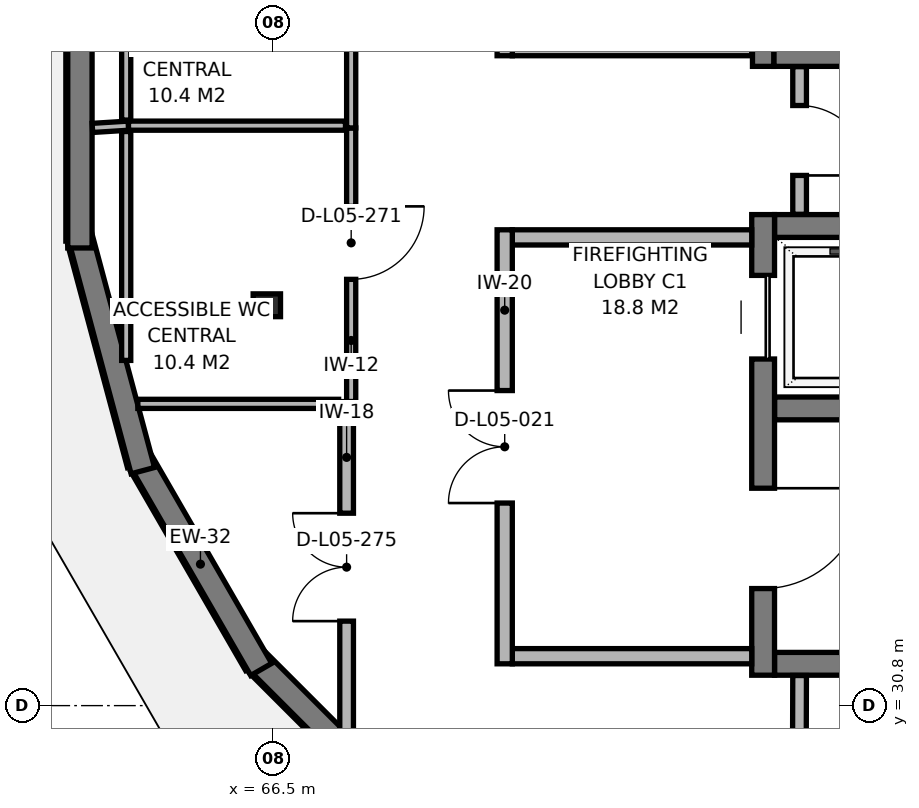
"""IFC4 building model, lengths in metres.
Left out: names, types, materials, properties, quantities, classifications, styles, units other than length and angle.
Written with IfcOpenShell. Run it as: python <this file> out.ifc"""

import sys

from ifc_helpers import new_model, si_unit, direction, frame, frame_2d, origin, origin_2d, place, context, subcontext, project, spatial, rectangle, i_section, extrude, element, fill, save


model = new_model("IFC4")
c1 = context("Model", 3, precision=1e-05, world=origin(), true_north=direction((0.0, 1.0)))
c2 = subcontext(c1, "Body", "Model", "MODEL_VIEW")
j1 = project(units=[si_unit("LENGTHUNIT", "METRE"), si_unit("PLANEANGLEUNIT", "RADIAN")], contexts=[c1])
p1 = place(None, origin())
s1 = spatial("IfcSite", under=j1, at=p1, CompositionType="ELEMENT")
p2 = place(p1, origin())
s2 = spatial("IfcBuilding", under=s1, at=p2, CompositionType="ELEMENT")
p3 = place(p2, frame((0.0, 0.0, 21.6)))
s3 = spatial("IfcBuildingStorey", under=s2, at=p3, CompositionType="ELEMENT", Elevation=21.6)
p4 = place(p3, frame((66.42, 36.067, 0.0), z_axis=(0.0, 0.0, 1.0), x_axis=(1.0, 0.0, 0.0)))
e1 = element("IfcColumn", 1, at=p4, inside=s3, PredefinedType="COLUMN", context=c2, shape_type="SweptSolid", body=[
    extrude(i_section(OverallWidth=0.3, OverallDepth=0.36, WebThickness=0.012, FlangeThickness=0.022, FilletRadius=0.027, at=origin_2d()), origin(), (0.0, 0.0, 1.0), 4.2),
])
p5 = place(p3, frame((68.528, 29.153, 0.0), z_axis=(0.0, 0.0, 1.0), x_axis=(-0.707106781187, 0.707106781187, 0.0)))
e2 = element("IfcWall", 2, at=p5, inside=s3, PredefinedType="SOLIDWALL", context=c2, shape_type="SweptSolid", body=[
    extrude(rectangle(XDim=3.198, YDim=0.32, at=frame_2d((1.599, 0.0))), origin(), (0.0, 0.0, 1.0), 4.0),
])
p6 = place(p3, frame((66.346, 31.276, 0.0), z_axis=(0.0, 0.0, 1.0), x_axis=(-0.499964726069, 0.86604576824, 0.0)))
e3 = element("IfcWall", 3, at=p6, inside=s3, PredefinedType="SOLIDWALL", context=c2, shape_type="SweptSolid", body=[
    extrude(rectangle(XDim=3.198, YDim=0.32, at=frame_2d((1.599, 0.0))), origin(), (0.0, 0.0, 1.0), 4.0),
])
for number, where, z_axis, x_axis in (
    (4, (64.789, 33.892, 0.0), (0.0, 0.0, 1.0), (-0.259, 0.966, 0.0)),
    (5, (63.961, 36.821, 0.0), (0.0, 0.0, 1.0), (0.0, 1.0, 0.0)),
):
    element("IfcWall", number, at=place(p3, frame(where, z_axis=z_axis, x_axis=x_axis)), inside=s3, PredefinedType="SOLIDWALL", context=c2, shape_type="SweptSolid", body=[
        extrude(rectangle(XDim=3.198, YDim=0.32, at=frame_2d((1.599, 0.0))), origin(), (0.0, 0.0, 1.0), 4.0),
    ])
for number, where, z_axis, x_axis in (
    (6, (73.1, 31.35, 0.0), (0.0, 0.0, 1.0), (1.0, 0.0, 0.0)),
    (7, (80.8, 34.71, 0.0), (0.0, 0.0, 1.0), (-1.0, 0.0, 0.0)),
):
    element("IfcWall", number, at=place(p3, frame(where, z_axis=z_axis, x_axis=x_axis)), inside=s3, PredefinedType="SHEAR", context=c2, shape_type="SweptSolid", body=[
        extrude(rectangle(XDim=7.7, YDim=0.3, at=frame_2d((3.85, 0.0))), origin(), (0.0, 0.0, 1.0), 4.0),
    ])
p7 = place(p3, frame((76.3, 37.11, 0.0), z_axis=(0.0, 0.0, 1.0), x_axis=(-1.0, 0.0, 0.0)))
e8 = element("IfcWall", 8, at=p7, inside=s3, PredefinedType="SHEAR", context=c2, shape_type="SweptSolid", body=[
    extrude(rectangle(XDim=3.2, YDim=0.3, at=frame_2d((1.6, 0.0))), origin(), (0.0, 0.0, 1.0), 4.0),
])
p8 = place(p3, frame((72.95, 37.26, 0.0), z_axis=(0.0, 0.0, 1.0), x_axis=(0.0, -1.0, 0.0)))
e9 = element("IfcWall", 9, at=p8, inside=s3, PredefinedType="SHEAR", context=c2, shape_type="SweptSolid", body=[
    extrude(rectangle(XDim=6.06, YDim=0.3, at=frame_2d((3.03, 0.0))), origin(), (0.0, 0.0, 1.0), 4.0),
])
p9 = place(p8, frame((0.8, 0.0, 0.0)))
e10 = element("IfcOpeningElement", 10, at=p9, cuts=e9, PredefinedType="OPENING", context=c2, shape_type="SweptSolid", body=[
    extrude(rectangle(XDim=1.1, YDim=2.12, at=frame_2d((0.55, 1.06))), frame((0.0, 0.16, 0.0), z_axis=(0.0, -1.0, 0.0), x_axis=(1.0, 0.0, 0.0)), (0.0, 0.0, 1.0), 0.32),
])
p10 = place(p8, frame((3.6, 0.0, 0.0)))
e11 = element("IfcOpeningElement", 11, at=p10, cuts=e9, PredefinedType="OPENING", context=c2, shape_type="SweptSolid", body=[
    extrude(rectangle(XDim=1.32, YDim=2.12, at=frame_2d((0.66, 1.06))), frame((0.0, 0.16, 0.0), z_axis=(0.0, -1.0, 0.0), x_axis=(1.0, 0.0, 0.0)), (0.0, 0.0, 1.0), 0.32),
])
p11 = place(p3, frame((69.65, 31.45, 0.0), z_axis=(0.0, 0.0, 1.0), x_axis=(1.0, 0.0, 0.0)))
e12 = element("IfcWall", 12, at=p11, inside=s3, PredefinedType="PARTITIONING", context=c2, shape_type="SweptSolid", body=[
    extrude(rectangle(XDim=3.15, YDim=0.2, at=frame_2d((1.575, 0.0))), origin(), (0.0, 0.0, 1.0), 3.49),
])
p12 = place(p3, frame((72.8, 36.96, 0.0), z_axis=(0.0, 0.0, 1.0), x_axis=(-1.0, 0.0, 0.0)))
e13 = element("IfcWall", 13, at=p12, inside=s3, PredefinedType="PARTITIONING", context=c2, shape_type="SweptSolid", body=[
    extrude(rectangle(XDim=3.15, YDim=0.2, at=frame_2d((1.575, 0.0))), origin(), (0.0, 0.0, 1.0), 4.0),
])
p13 = place(p3, frame((69.55, 31.35, 0.0), z_axis=(0.0, 0.0, 1.0), x_axis=(0.0, 1.0, 0.0)))
e14 = element("IfcWall", 14, at=p13, inside=s3, PredefinedType="PARTITIONING", context=c2, shape_type="SweptSolid", body=[
    extrude(rectangle(XDim=5.71, YDim=0.2, at=frame_2d((2.855, 0.0))), origin(), (0.0, 0.0, 1.0), 3.49),
])
p14 = place(p13, frame((2.115, 0.0, 0.0)))
e15 = element("IfcOpeningElement", 15, at=p14, cuts=e14, PredefinedType="OPENING", context=c2, shape_type="SweptSolid", body=[
    extrude(rectangle(XDim=1.48, YDim=2.15, at=frame_2d((0.74, 1.075))), frame((0.0, 0.11, 0.0), z_axis=(0.0, -1.0, 0.0), x_axis=(1.0, 0.0, 0.0)), (0.0, 0.0, 1.0), 0.22),
])
p15 = place(p3, frame((73.09, 39.35, 0.0), z_axis=(0.0, 0.0, 1.0), x_axis=(1.0, 0.0, 0.0)))
e16 = element("IfcWall", 16, at=p15, inside=s3, PredefinedType="SHEAR", context=c2, shape_type="SweptSolid", body=[
    extrude(rectangle(XDim=7.7, YDim=0.28, at=frame_2d((3.85, 0.0))), origin(), (0.0, 0.0, 1.0), 4.0),
])
p16 = place(p3, frame((72.95, 45.25, 0.0), z_axis=(0.0, 0.0, 1.0), x_axis=(0.0, -1.0, 0.0)))
e17 = element("IfcWall", 17, at=p16, inside=s3, PredefinedType="SHEAR", context=c2, shape_type="SweptSolid", body=[
    extrude(rectangle(XDim=6.04, YDim=0.28, at=frame_2d((3.02, 0.0))), origin(), (0.0, 0.0, 1.0), 4.0),
])
p17 = place(p16, frame((0.8, 0.0, 0.0)))
e18 = element("IfcOpeningElement", 18, at=p17, cuts=e17, PredefinedType="OPENING", context=c2, shape_type="SweptSolid", body=[
    extrude(rectangle(XDim=1.1, YDim=2.12, at=frame_2d((0.55, 1.06))), frame((0.0, 0.15, 0.0), z_axis=(0.0, -1.0, 0.0), x_axis=(1.0, 0.0, 0.0)), (0.0, 0.0, 1.0), 0.3),
])
p18 = place(p16, frame((3.6, 0.0, 0.0)))
e19 = element("IfcOpeningElement", 19, at=p18, cuts=e17, PredefinedType="OPENING", context=c2, shape_type="SweptSolid", body=[
    extrude(rectangle(XDim=1.32, YDim=2.12, at=frame_2d((0.66, 1.06))), frame((0.0, 0.15, 0.0), z_axis=(0.0, -1.0, 0.0), x_axis=(1.0, 0.0, 0.0)), (0.0, 0.0, 1.0), 0.3),
])
p19 = place(p3, frame((69.65, 39.45, 0.0), z_axis=(0.0, 0.0, 1.0), x_axis=(1.0, 0.0, 0.0)))
e20 = element("IfcWall", 20, at=p19, inside=s3, PredefinedType="PARTITIONING", context=c2, shape_type="SweptSolid", body=[
    extrude(rectangle(XDim=3.15, YDim=0.2, at=frame_2d((1.575, 0.0))), origin(), (0.0, 0.0, 1.0), 4.0),
])
p20 = place(p3, frame((69.55, 39.35, 0.0), z_axis=(0.0, 0.0, 1.0), x_axis=(0.0, 1.0, 0.0)))
e21 = element("IfcWall", 21, at=p20, inside=s3, PredefinedType="PARTITIONING", context=c2, shape_type="SweptSolid", body=[
    extrude(rectangle(XDim=5.71, YDim=0.2, at=frame_2d((2.855, 0.0))), origin(), (0.0, 0.0, 1.0), 3.49),
])
p21 = place(p20, frame((2.115, 0.0, 0.0)))
e22 = element("IfcOpeningElement", 22, at=p21, cuts=e21, PredefinedType="OPENING", context=c2, shape_type="SweptSolid", body=[
    extrude(rectangle(XDim=1.48, YDim=2.15, at=frame_2d((0.74, 1.075))), frame((0.0, 0.11, 0.0), z_axis=(0.0, -1.0, 0.0), x_axis=(1.0, 0.0, 0.0)), (0.0, 0.0, 1.0), 0.22),
])
p22 = place(p3, frame((67.53, 38.4, 0.0), z_axis=(0.0, 0.0, 1.0), x_axis=(0.0, -1.0, 0.0)))
e23 = element("IfcWall", 23, at=p22, inside=s3, PredefinedType="PARTITIONING", context=c2, shape_type="SweptSolid", body=[
    extrude(rectangle(XDim=3.6, YDim=0.12, at=frame_2d((1.8, 0.0))), origin(), (0.0, 0.0, 1.0), 3.49),
])
p23 = place(p22, frame((1.032, 0.0, 0.0)))
e24 = element("IfcOpeningElement", 24, at=p23, cuts=e23, PredefinedType="OPENING", context=c2, shape_type="SweptSolid", body=[
    extrude(rectangle(XDim=0.96, YDim=2.1, at=frame_2d((0.48, 1.05))), frame((0.0, 0.07, 0.0), z_axis=(0.0, -1.0, 0.0), x_axis=(1.0, 0.0, 0.0)), (0.0, 0.0, 1.0), 0.14),
])
p24 = place(p3, frame((67.53, 42.0, 0.0), z_axis=(0.0, 0.0, 1.0), x_axis=(0.0, -1.0, 0.0)))
e25 = element("IfcWall", 25, at=p24, inside=s3, PredefinedType="PARTITIONING", context=c2, shape_type="SweptSolid", body=[
    extrude(rectangle(XDim=3.6, YDim=0.12, at=frame_2d((1.8, 0.0))), origin(), (0.0, 0.0, 1.0), 3.49),
])
p25 = place(p24, frame((1.29, 0.0, 0.0)))
e26 = element("IfcOpeningElement", 26, at=p25, cuts=e25, PredefinedType="OPENING", context=c2, shape_type="SweptSolid", body=[
    extrude(rectangle(XDim=1.02, YDim=2.12, at=frame_2d((0.51, 1.06))), frame((0.0, 0.07, 0.0), z_axis=(0.0, -1.0, 0.0), x_axis=(1.0, 0.0, 0.0)), (0.0, 0.0, 1.0), 0.14),
])
p26 = place(p3, frame((73.43, 39.206, 0.0), z_axis=(0.0, 0.0, 1.0), x_axis=(0.0, -1.0, 0.0)))
e27 = element("IfcWall", 27, at=p26, inside=s3, PredefinedType="PARTITIONING", context=c2, shape_type="SweptSolid", body=[
    extrude(rectangle(XDim=1.942, YDim=0.18, at=frame_2d((0.971, 0.0))), origin(), (0.0, 0.0, 1.0), 3.99),
])
p27 = place(p26, frame((0.511, 0.0, 0.0)))
e28 = element("IfcOpeningElement", 28, at=p27, cuts=e27, PredefinedType="OPENING", context=c2, shape_type="SweptSolid", body=[
    extrude(rectangle(XDim=0.92, YDim=2.08, at=frame_2d((0.46, 1.04))), frame((0.0, 0.1, 0.0), z_axis=(0.0, -1.0, 0.0), x_axis=(1.0, 0.0, 0.0)), (0.0, 0.0, 1.0), 0.2),
])
p28 = place(p3, frame((73.43, 31.196, 0.0), z_axis=(0.0, 0.0, 1.0), x_axis=(-0.00291284467, -0.999995757659, 0.0)))
e29 = element("IfcWall", 29, at=p28, inside=s3, PredefinedType="PARTITIONING", context=c2, shape_type="SweptSolid", body=[
    extrude(rectangle(XDim=3.017, YDim=0.18, at=frame_2d((1.509, 0.0))), origin(), (0.0, 0.0, 1.0), 3.49),
])
p29 = place(p3, frame((67.47, 30.443, 0.0), z_axis=(0.0, 0.0, 1.0), x_axis=(0.0, 1.0, 0.0)))
e30 = element("IfcWall", 30, at=p29, inside=s3, PredefinedType="PARTITIONING", context=c2, shape_type="SweptSolid", body=[
    extrude(rectangle(XDim=4.357, YDim=0.18, at=frame_2d((2.178, 0.0))), origin(), (0.0, 0.0, 1.0), 3.49),
])
p30 = place(p29, frame((1.469, 0.0, 0.0)))
e31 = element("IfcOpeningElement", 31, at=p30, cuts=e30, PredefinedType="OPENING", context=c2, shape_type="SweptSolid", body=[
    extrude(rectangle(XDim=1.42, YDim=2.18, at=frame_2d((0.71, 1.09))), frame((0.0, 0.1, 0.0), z_axis=(0.0, -1.0, 0.0), x_axis=(1.0, 0.0, 0.0)), (0.0, 0.0, 1.0), 0.2),
])
p31 = place(p3, frame((64.125, 38.4, 0.0), z_axis=(0.0, 0.0, 1.0), x_axis=(0.998072483986, 0.062058977678, 0.0)))
e32 = element("IfcWall", 32, at=p31, inside=s3, PredefinedType="PARTITIONING", context=c2, shape_type="SweptSolid", body=[
    extrude(rectangle(XDim=0.476, YDim=0.12, at=frame_2d((0.238, 0.0))), origin(), (0.0, 0.0, 1.0), 3.99),
])
p32 = place(p3, frame((64.6, 38.43, 0.0), z_axis=(0.0, 0.0, 1.0), x_axis=(1.0, 0.0, 0.0)))
e33 = element("IfcWall", 33, at=p32, inside=s3, PredefinedType="PARTITIONING", context=c2, shape_type="SweptSolid", body=[
    extrude(rectangle(XDim=2.855, YDim=0.12, at=frame_2d((1.427, 0.0))), origin(), (0.0, 0.0, 1.0), 3.49),
])
p33 = place(p3, frame((64.57, 35.342, 0.0), z_axis=(0.0, 0.0, 1.0), x_axis=(0.0, 1.0, 0.0)))
e34 = element("IfcWall", 34, at=p33, inside=s3, PredefinedType="PARTITIONING", context=c2, shape_type="SweptSolid", body=[
    extrude(rectangle(XDim=3.011, YDim=0.12, at=frame_2d((1.506, 0.0))), origin(), (0.0, 0.0, 1.0), 3.99),
])
p34 = place(p3, frame((67.365, 34.77, 0.0), z_axis=(0.0, 0.0, 1.0), x_axis=(-1.0, 0.0, 0.0)))
e35 = element("IfcWall", 35, at=p34, inside=s3, PredefinedType="PARTITIONING", context=c2, shape_type="SweptSolid", body=[
    extrude(rectangle(XDim=2.642, YDim=0.12, at=frame_2d((1.321, 0.0))), origin(), (0.0, 0.0, 1.0), 3.49),
])
p35 = place(p3, frame((64.57, 38.503, 0.0), z_axis=(0.0, 0.0, 1.0), x_axis=(0.0, 1.0, 0.0)))
e36 = element("IfcWall", 36, at=p35, inside=s3, PredefinedType="PARTITIONING", context=c2, shape_type="SweptSolid", body=[
    extrude(rectangle(XDim=3.155, YDim=0.12, at=frame_2d((1.578, 0.0))), origin(), (0.0, 0.0, 1.0), 3.99),
])
p36 = place(p9, origin())
e37 = element("IfcDoor", 37, at=p36, inside=s3, OperationType="SLIDING_TO_LEFT", PredefinedType="DOOR", context=c2, shape_type="SweptSolid", body=[
    extrude(rectangle(XDim=1.1, YDim=2.12, at=frame_2d((0.55, 1.06))), frame((0.0, 0.025, 0.0), z_axis=(0.0, -1.0, 0.0), x_axis=(1.0, 0.0, 0.0)), (0.0, 0.0, 1.0), 0.05),
])
fill(e10, e37)
p37 = place(p10, origin())
e38 = element("IfcDoor", 38, at=p37, inside=s3, OperationType="SINGLE_SWING_LEFT", PredefinedType="DOOR", context=c2, shape_type="SweptSolid", body=[
    extrude(rectangle(XDim=1.32, YDim=2.12, at=frame_2d((0.66, 1.06))), frame((0.0, 0.025, 0.0), z_axis=(0.0, -1.0, 0.0), x_axis=(1.0, 0.0, 0.0)), (0.0, 0.0, 1.0), 0.05),
])
fill(e11, e38)
p38 = place(p14, origin())
e39 = element("IfcDoor", 39, at=p38, inside=s3, OperationType="DOUBLE_DOOR_SINGLE_SWING", PredefinedType="DOOR", context=c2, shape_type="SweptSolid", body=[
    extrude(rectangle(XDim=1.48, YDim=2.15, at=frame_2d((0.74, 1.075))), frame((0.0, 0.025, 0.0), z_axis=(0.0, -1.0, 0.0), x_axis=(1.0, 0.0, 0.0)), (0.0, 0.0, 1.0), 0.05),
])
fill(e15, e39)
p39 = place(p23, origin())
e40 = element("IfcDoor", 40, at=p39, inside=s3, OperationType="SINGLE_SWING_LEFT", PredefinedType="DOOR", context=c2, shape_type="SweptSolid", body=[
    extrude(rectangle(XDim=0.96, YDim=2.1, at=frame_2d((0.48, 1.05))), frame((0.0, 0.025, 0.0), z_axis=(0.0, -1.0, 0.0), x_axis=(1.0, 0.0, 0.0)), (0.0, 0.0, 1.0), 0.05),
])
fill(e24, e40)
p40 = place(p27, origin())
e41 = element("IfcDoor", 41, at=p40, inside=s3, OperationType="SINGLE_SWING_RIGHT", PredefinedType="DOOR", context=c2, shape_type="SweptSolid", body=[
    extrude(rectangle(XDim=0.92, YDim=2.08, at=frame_2d((0.46, 1.04))), frame((0.0, 0.025, 0.0), z_axis=(0.0, -1.0, 0.0), x_axis=(1.0, 0.0, 0.0)), (0.0, 0.0, 1.0), 0.05),
])
fill(e28, e41)
p41 = place(p30, origin())
e42 = element("IfcDoor", 42, at=p41, inside=s3, OperationType="DOUBLE_DOOR_SINGLE_SWING", PredefinedType="DOOR", context=c2, shape_type="SweptSolid", body=[
    extrude(rectangle(XDim=1.42, YDim=2.18, at=frame_2d((0.71, 1.09))), frame((0.0, 0.025, 0.0), z_axis=(0.0, -1.0, 0.0), x_axis=(1.0, 0.0, 0.0)), (0.0, 0.0, 1.0), 0.05),
])
fill(e31, e42)
save(model, sys.argv[1])
